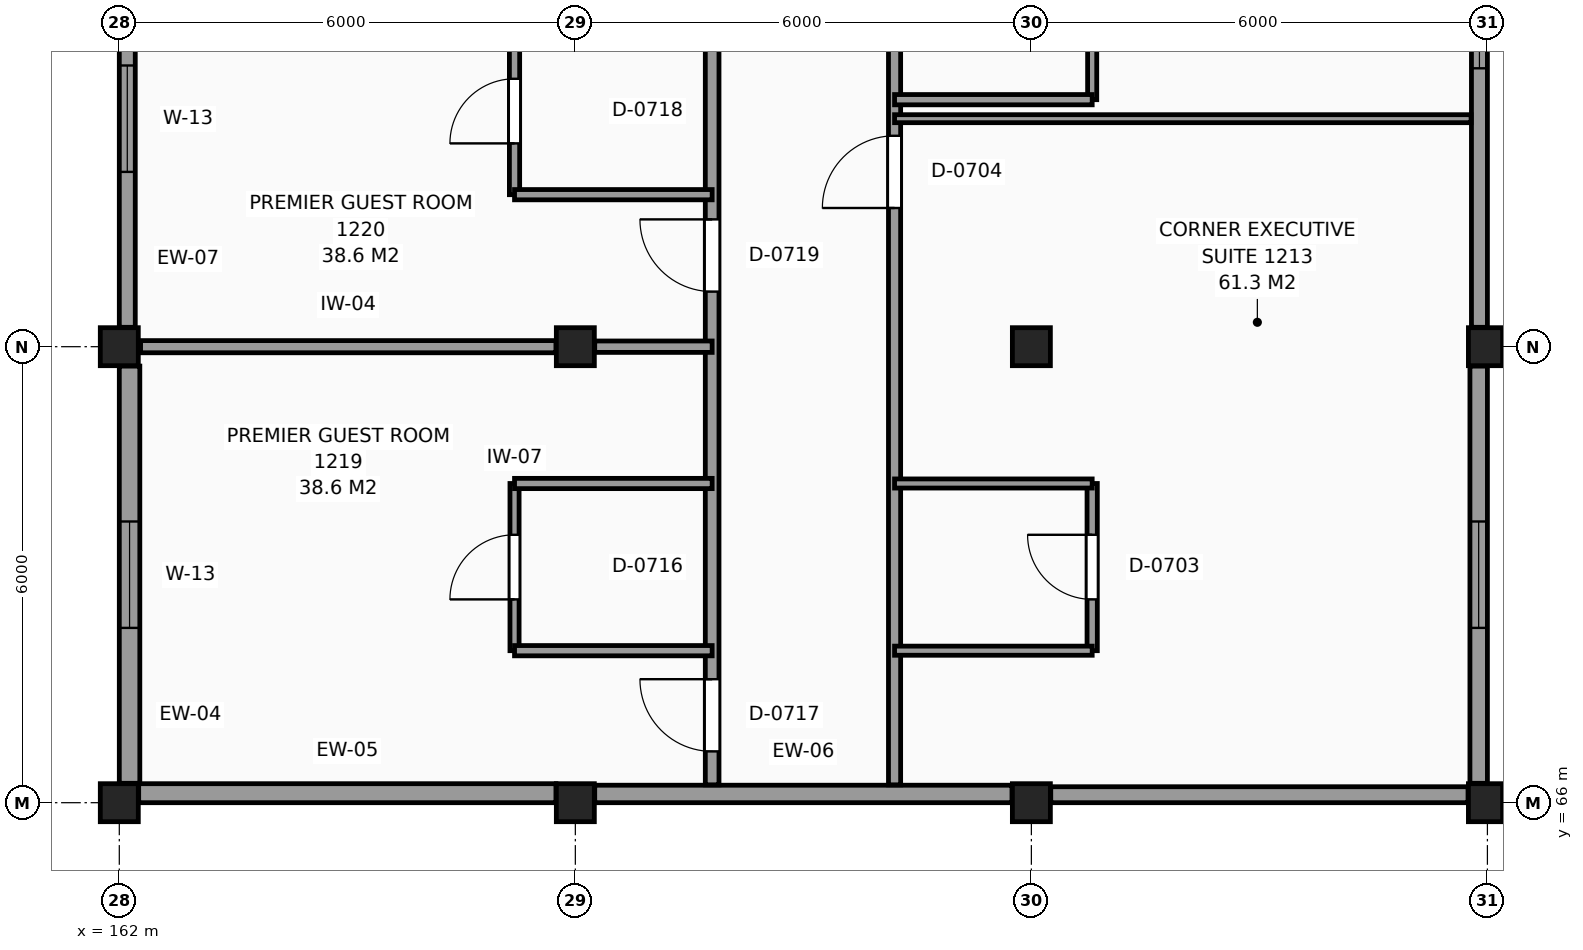
"""IFC4 building model, lengths in metres.
Left out: names, types, materials, properties, quantities, classifications, styles, units other than length and angle.
Written with IfcOpenShell. Run it as: python <this file> out.ifc"""

import sys

from ifc_helpers import new_model, si_unit, direction, frame, frame_2d, origin, origin_2d, place, context, subcontext, project, spatial, rectangle, extrude, element, fill, save


model = new_model("IFC4")
c1 = context("Model", 3, precision=1e-05, world=origin(), true_north=direction((0.0, 1.0)))
c2 = subcontext(c1, "Body", "Model", "MODEL_VIEW")
j1 = project(units=[si_unit("LENGTHUNIT", "METRE"), si_unit("PLANEANGLEUNIT", "RADIAN")], contexts=[c1])
p1 = place(None, origin())
s1 = spatial("IfcSite", under=j1, at=p1, CompositionType="ELEMENT")
p2 = place(p1, origin())
s2 = spatial("IfcBuilding", under=s1, at=p2, CompositionType="ELEMENT")
p3 = place(p2, frame((0.0, 0.0, 48.0)))
s3 = spatial("IfcBuildingStorey", under=s2, at=p3, CompositionType="ELEMENT", Elevation=48.0)
for number, where, z_axis, x_axis in (
    (1, (162.0, 66.0, 0.0), (0.0, 0.0, 1.0), (1.0, 0.0, 0.0)),
    (2, (162.0, 72.0, 0.0), (0.0, 0.0, 1.0), (1.0, 0.0, 0.0)),
    (3, (168.0, 66.0, 0.0), (0.0, 0.0, 1.0), (1.0, 0.0, 0.0)),
    (4, (168.0, 72.0, 0.0), (0.0, 0.0, 1.0), (1.0, 0.0, 0.0)),
    (5, (174.0, 66.0, 0.0), (0.0, 0.0, 1.0), (1.0, 0.0, 0.0)),
    (6, (174.0, 72.0, 0.0), (0.0, 0.0, 1.0), (1.0, 0.0, 0.0)),
    (7, (180.0, 66.0, 0.0), (0.0, 0.0, 1.0), (1.0, 0.0, 0.0)),
    (8, (180.0, 72.0, 0.0), (0.0, 0.0, 1.0), (1.0, 0.0, 0.0)),
):
    element("IfcColumn", number, at=place(p3, frame(where, z_axis=z_axis, x_axis=x_axis)), inside=s3, PredefinedType="COLUMN", context=c2, shape_type="SweptSolid", body=[
        extrude(rectangle(XDim=0.5, YDim=0.5, at=origin_2d()), origin(), (0.0, 0.0, 1.0), 3.3),
    ])
p4 = place(p3, frame((179.885, 66.255, 0.0), z_axis=(0.0, 0.0, 1.0), x_axis=(0.0, 1.0, 0.0)))
e9 = element("IfcWall", 9, at=p4, inside=s3, PredefinedType="SOLIDWALL", context=c2, shape_type="SweptSolid", body=[
    extrude(rectangle(XDim=5.49, YDim=0.23, at=frame_2d((2.745, 0.0))), origin(), (0.0, 0.0, 1.0), 2.4),
])
p5 = place(p4, frame((2.045, 0.0, 0.8)))
e10 = element("IfcOpeningElement", 10, at=p5, cuts=e9, PredefinedType="OPENING", context=c2, shape_type="SweptSolid", body=[
    extrude(rectangle(XDim=1.4, YDim=1.4, at=frame_2d((0.7, 0.7))), frame((0.0, 0.125, 0.0), z_axis=(0.0, -1.0, 0.0), x_axis=(1.0, 0.0, 0.0)), (0.0, 0.0, 1.0), 0.25),
])
p6 = place(p3, frame((179.895, 72.255, 0.0), z_axis=(0.0, 0.0, 1.0), x_axis=(0.0, 1.0, 0.0)))
e11 = element("IfcWall", 11, at=p6, inside=s3, PredefinedType="SOLIDWALL", context=c2, shape_type="SweptSolid", body=[
    extrude(rectangle(XDim=5.49, YDim=0.21, at=frame_2d((2.745, 0.0))), origin(), (0.0, 0.0, 1.0), 2.4),
])
p7 = place(p6, frame((3.408, 0.0, 0.8)))
e12 = element("IfcOpeningElement", 12, at=p7, cuts=e11, PredefinedType="OPENING", context=c2, shape_type="SweptSolid", body=[
    extrude(rectangle(XDim=1.4, YDim=1.4, at=frame_2d((0.7, 0.7))), frame((0.0, 0.115, 0.0), z_axis=(0.0, -1.0, 0.0), x_axis=(1.0, 0.0, 0.0)), (0.0, 0.0, 1.0), 0.23),
])
p8 = place(p3, frame((162.105, 77.745, 0.0), z_axis=(0.0, 0.0, 1.0), x_axis=(0.0, -1.0, 0.0)))
e13 = element("IfcWall", 13, at=p8, inside=s3, PredefinedType="SOLIDWALL", context=c2, shape_type="SweptSolid", body=[
    extrude(rectangle(XDim=5.49, YDim=0.21, at=frame_2d((2.745, 0.0))), origin(), (0.0, 0.0, 1.0), 2.4),
])
p9 = place(p8, frame((2.045, 0.0, 0.8)))
e14 = element("IfcOpeningElement", 14, at=p9, cuts=e13, PredefinedType="OPENING", context=c2, shape_type="SweptSolid", body=[
    extrude(rectangle(XDim=1.4, YDim=1.4, at=frame_2d((0.7, 0.7))), frame((0.0, 0.115, 0.0), z_axis=(0.0, -1.0, 0.0), x_axis=(1.0, 0.0, 0.0)), (0.0, 0.0, 1.0), 0.23),
])
p10 = place(p3, frame((162.135, 71.745, 0.0), z_axis=(0.0, 0.0, 1.0), x_axis=(0.0, -1.0, 0.0)))
e15 = element("IfcWall", 15, at=p10, inside=s3, PredefinedType="SOLIDWALL", context=c2, shape_type="SweptSolid", body=[
    extrude(rectangle(XDim=5.49, YDim=0.27, at=frame_2d((2.745, 0.0))), origin(), (0.0, 0.0, 1.0), 2.4),
])
p11 = place(p10, frame((2.045, 0.0, 0.8)))
e16 = element("IfcOpeningElement", 16, at=p11, cuts=e15, PredefinedType="OPENING", context=c2, shape_type="SweptSolid", body=[
    extrude(rectangle(XDim=1.4, YDim=1.4, at=frame_2d((0.7, 0.7))), frame((0.0, 0.145, 0.0), z_axis=(0.0, -1.0, 0.0), x_axis=(1.0, 0.0, 0.0)), (0.0, 0.0, 1.0), 0.29),
])
p12 = place(p3, frame((162.255, 66.125, 0.0), z_axis=(0.0, 0.0, 1.0), x_axis=(1.0, 0.0, 0.0)))
e17 = element("IfcWall", 17, at=p12, inside=s3, PredefinedType="SOLIDWALL", context=c2, shape_type="SweptSolid", body=[
    extrude(rectangle(XDim=5.49, YDim=0.25, at=frame_2d((2.745, 0.0))), origin(), (0.0, 0.0, 1.0), 2.25),
])
p13 = place(p3, frame((168.255, 66.115, 0.0), z_axis=(0.0, 0.0, 1.0), x_axis=(1.0, 0.0, 0.0)))
e18 = element("IfcWall", 18, at=p13, inside=s3, PredefinedType="SOLIDWALL", context=c2, shape_type="SweptSolid", body=[
    extrude(rectangle(XDim=5.49, YDim=0.23, at=frame_2d((2.745, 0.0))), origin(), (0.0, 0.0, 1.0), 2.25),
])
p14 = place(p3, frame((174.255, 66.105, 0.0), z_axis=(0.0, 0.0, 1.0), x_axis=(1.0, 0.0, 0.0)))
e19 = element("IfcWall", 19, at=p14, inside=s3, PredefinedType="SOLIDWALL", context=c2, shape_type="SweptSolid", body=[
    extrude(rectangle(XDim=5.49, YDim=0.21, at=frame_2d((2.745, 0.0))), origin(), (0.0, 0.0, 1.0), 2.25),
])
p15 = place(p3, frame((167.2, 68.0, 0.0), z_axis=(0.0, 0.0, 1.0), x_axis=(0.0, 1.0, 0.0)))
e20 = element("IfcWall", 20, at=p15, inside=s3, PredefinedType="PARTITIONING", context=c2, shape_type="SweptSolid", body=[
    extrude(rectangle(XDim=2.2, YDim=0.12, at=frame_2d((1.1, 0.0))), origin(), (0.0, 0.0, 1.0), 3.05),
])
p16 = place(p15, frame((0.675, 0.0, 0.0)))
e21 = element("IfcOpeningElement", 21, at=p16, cuts=e20, PredefinedType="OPENING", context=c2, shape_type="SweptSolid", body=[
    extrude(rectangle(XDim=0.85, YDim=2.1, at=frame_2d((0.425, 1.05))), frame((0.0, 0.07, 0.0), z_axis=(0.0, -1.0, 0.0), x_axis=(1.0, 0.0, 0.0)), (0.0, 0.0, 1.0), 0.14),
])
p17 = place(p3, frame((167.2, 74.0, 0.0), z_axis=(0.0, 0.0, 1.0), x_axis=(0.0, 1.0, 0.0)))
e22 = element("IfcWall", 22, at=p17, inside=s3, PredefinedType="PARTITIONING", context=c2, shape_type="SweptSolid", body=[
    extrude(rectangle(XDim=2.2, YDim=0.135, at=frame_2d((1.1, 0.0))), origin(), (0.0, 0.0, 1.0), 3.05),
])
p18 = place(p17, frame((0.675, 0.0, 0.0)))
e23 = element("IfcOpeningElement", 23, at=p18, cuts=e22, PredefinedType="OPENING", context=c2, shape_type="SweptSolid", body=[
    extrude(rectangle(XDim=0.85, YDim=2.1, at=frame_2d((0.425, 1.05))), frame((0.0, 0.078, 0.0), z_axis=(0.0, -1.0, 0.0), x_axis=(1.0, 0.0, 0.0)), (0.0, 0.0, 1.0), 0.155),
])
p19 = place(p3, frame((169.8, 66.235, 0.0), z_axis=(0.0, 0.0, 1.0), x_axis=(0.0, 1.0, 0.0)))
e24 = element("IfcWall", 24, at=p19, inside=s3, PredefinedType="PARTITIONING", context=c2, shape_type="SweptSolid", body=[
    extrude(rectangle(XDim=41.585, YDim=0.18, at=frame_2d((20.792, 0.0))), origin(), (0.0, 0.0, 1.0), 3.05),
])
p20 = place(p19, frame((26.165, 0.0, 0.0)))
e25 = element("IfcOpeningElement", 25, at=p20, cuts=e24, PredefinedType="OPENING", context=c2, shape_type="SweptSolid", body=[
    extrude(rectangle(XDim=1.2, YDim=2.2, at=frame_2d((0.6, 1.1))), frame((0.0, 0.1, 0.0), z_axis=(0.0, -1.0, 0.0), x_axis=(1.0, 0.0, 0.0)), (0.0, 0.0, 1.0), 0.2),
])
p21 = place(p19, frame((0.44, 0.0, 0.0)))
e26 = element("IfcOpeningElement", 26, at=p21, cuts=e24, PredefinedType="OPENING", context=c2, shape_type="SweptSolid", body=[
    extrude(rectangle(XDim=0.95, YDim=2.1, at=frame_2d((0.475, 1.05))), frame((0.0, 0.1, 0.0), z_axis=(0.0, -1.0, 0.0), x_axis=(1.0, 0.0, 0.0)), (0.0, 0.0, 1.0), 0.2),
])
p22 = place(p19, frame((6.49, 0.0, 0.0)))
e27 = element("IfcOpeningElement", 27, at=p22, cuts=e24, PredefinedType="OPENING", context=c2, shape_type="SweptSolid", body=[
    extrude(rectangle(XDim=0.95, YDim=2.1, at=frame_2d((0.475, 1.05))), frame((0.0, 0.1, 0.0), z_axis=(0.0, -1.0, 0.0), x_axis=(1.0, 0.0, 0.0)), (0.0, 0.0, 1.0), 0.2),
])
p23 = place(p19, frame((30.49, 0.0, 0.0)))
e28 = element("IfcOpeningElement", 28, at=p23, cuts=e24, PredefinedType="OPENING", context=c2, shape_type="SweptSolid", body=[
    extrude(rectangle(XDim=0.95, YDim=2.1, at=frame_2d((0.475, 1.05))), frame((0.0, 0.1, 0.0), z_axis=(0.0, -1.0, 0.0), x_axis=(1.0, 0.0, 0.0)), (0.0, 0.0, 1.0), 0.2),
])
p24 = place(p19, frame((36.49, 0.0, 0.0)))
e29 = element("IfcOpeningElement", 29, at=p24, cuts=e24, PredefinedType="OPENING", context=c2, shape_type="SweptSolid", body=[
    extrude(rectangle(XDim=0.95, YDim=2.1, at=frame_2d((0.475, 1.05))), frame((0.0, 0.1, 0.0), z_axis=(0.0, -1.0, 0.0), x_axis=(1.0, 0.0, 0.0)), (0.0, 0.0, 1.0), 0.2),
])
p25 = place(p3, frame((172.2, 66.235, 0.0), z_axis=(0.0, 0.0, 1.0), x_axis=(0.0, 1.0, 0.0)))
e30 = element("IfcWall", 30, at=p25, inside=s3, PredefinedType="PARTITIONING", context=c2, shape_type="SweptSolid", body=[
    extrude(rectangle(XDim=41.585, YDim=0.16, at=frame_2d((20.792, 0.0))), origin(), (0.0, 0.0, 1.0), 3.05),
])
p26 = place(p25, frame((7.59, 0.0, 0.0)))
e31 = element("IfcOpeningElement", 31, at=p26, cuts=e30, PredefinedType="OPENING", context=c2, shape_type="SweptSolid", body=[
    extrude(rectangle(XDim=0.95, YDim=2.1, at=frame_2d((0.475, 1.05))), frame((0.0, 0.09, 0.0), z_axis=(0.0, -1.0, 0.0), x_axis=(1.0, 0.0, 0.0)), (0.0, 0.0, 1.0), 0.18),
])
p27 = place(p25, frame((12.09, 0.0, 0.0)))
e32 = element("IfcOpeningElement", 32, at=p27, cuts=e30, PredefinedType="OPENING", context=c2, shape_type="SweptSolid", body=[
    extrude(rectangle(XDim=0.95, YDim=2.1, at=frame_2d((0.475, 1.05))), frame((0.0, 0.09, 0.0), z_axis=(0.0, -1.0, 0.0), x_axis=(1.0, 0.0, 0.0)), (0.0, 0.0, 1.0), 0.18),
])
p28 = place(p25, frame((16.29, 0.0, 0.0)))
e33 = element("IfcOpeningElement", 33, at=p28, cuts=e30, PredefinedType="OPENING", context=c2, shape_type="SweptSolid", body=[
    extrude(rectangle(XDim=0.95, YDim=2.1, at=frame_2d((0.475, 1.05))), frame((0.0, 0.09, 0.0), z_axis=(0.0, -1.0, 0.0), x_axis=(1.0, 0.0, 0.0)), (0.0, 0.0, 1.0), 0.18),
])
p29 = place(p25, frame((18.49, 0.0, 0.0)))
e34 = element("IfcOpeningElement", 34, at=p29, cuts=e30, PredefinedType="OPENING", context=c2, shape_type="SweptSolid", body=[
    extrude(rectangle(XDim=0.95, YDim=2.1, at=frame_2d((0.475, 1.05))), frame((0.0, 0.09, 0.0), z_axis=(0.0, -1.0, 0.0), x_axis=(1.0, 0.0, 0.0)), (0.0, 0.0, 1.0), 0.18),
])
p30 = place(p25, frame((24.49, 0.0, 0.0)))
e35 = element("IfcOpeningElement", 35, at=p30, cuts=e30, PredefinedType="OPENING", context=c2, shape_type="SweptSolid", body=[
    extrude(rectangle(XDim=0.95, YDim=2.1, at=frame_2d((0.475, 1.05))), frame((0.0, 0.09, 0.0), z_axis=(0.0, -1.0, 0.0), x_axis=(1.0, 0.0, 0.0)), (0.0, 0.0, 1.0), 0.18),
])
p31 = place(p25, frame((38.34, 0.0, 0.0)))
e36 = element("IfcOpeningElement", 36, at=p31, cuts=e30, PredefinedType="OPENING", context=c2, shape_type="SweptSolid", body=[
    extrude(rectangle(XDim=0.95, YDim=2.1, at=frame_2d((0.475, 1.05))), frame((0.0, 0.09, 0.0), z_axis=(0.0, -1.0, 0.0), x_axis=(1.0, 0.0, 0.0)), (0.0, 0.0, 1.0), 0.18),
])
p32 = place(p3, frame((174.8, 68.0, 0.0), z_axis=(0.0, 0.0, 1.0), x_axis=(0.0, 1.0, 0.0)))
e37 = element("IfcWall", 37, at=p32, inside=s3, PredefinedType="PARTITIONING", context=c2, shape_type="SweptSolid", body=[
    extrude(rectangle(XDim=2.2, YDim=0.135, at=frame_2d((1.1, 0.0))), origin(), (0.0, 0.0, 1.0), 3.05),
])
p33 = place(p32, frame((0.675, 0.0, 0.0)))
e38 = element("IfcOpeningElement", 38, at=p33, cuts=e37, PredefinedType="OPENING", context=c2, shape_type="SweptSolid", body=[
    extrude(rectangle(XDim=0.85, YDim=2.1, at=frame_2d((0.425, 1.05))), frame((0.0, 0.078, 0.0), z_axis=(0.0, -1.0, 0.0), x_axis=(1.0, 0.0, 0.0)), (0.0, 0.0, 1.0), 0.155),
])
p34 = place(p3, frame((174.8, 75.25, 0.0), z_axis=(0.0, 0.0, 1.0), x_axis=(0.0, 1.0, 0.0)))
e39 = element("IfcWall", 39, at=p34, inside=s3, PredefinedType="PARTITIONING", context=c2, shape_type="SweptSolid", body=[
    extrude(rectangle(XDim=2.2, YDim=0.12, at=frame_2d((1.1, 0.0))), origin(), (0.0, 0.0, 1.0), 3.05),
])
p35 = place(p34, frame((0.675, 0.0, 0.0)))
e40 = element("IfcOpeningElement", 40, at=p35, cuts=e39, PredefinedType="OPENING", context=c2, shape_type="SweptSolid", body=[
    extrude(rectangle(XDim=0.85, YDim=2.1, at=frame_2d((0.425, 1.05))), frame((0.0, 0.07, 0.0), z_axis=(0.0, -1.0, 0.0), x_axis=(1.0, 0.0, 0.0)), (0.0, 0.0, 1.0), 0.14),
])
p36 = place(p3, frame((167.2, 68.0, 0.0), z_axis=(0.0, 0.0, 1.0), x_axis=(1.0, 0.0, 0.0)))
e41 = element("IfcWall", 41, at=p36, inside=s3, PredefinedType="PARTITIONING", context=c2, shape_type="SweptSolid", body=[
    extrude(rectangle(XDim=2.6, YDim=0.135, at=frame_2d((1.3, 0.0))), origin(), (0.0, 0.0, 1.0), 3.05),
])
p37 = place(p3, frame((172.2, 68.0, 0.0), z_axis=(0.0, 0.0, 1.0), x_axis=(1.0, 0.0, 0.0)))
e42 = element("IfcWall", 42, at=p37, inside=s3, PredefinedType="PARTITIONING", context=c2, shape_type="SweptSolid", body=[
    extrude(rectangle(XDim=2.6, YDim=0.12, at=frame_2d((1.3, 0.0))), origin(), (0.0, 0.0, 1.0), 3.05),
])
p38 = place(p3, frame((167.2, 70.2, 0.0), z_axis=(0.0, 0.0, 1.0), x_axis=(1.0, 0.0, 0.0)))
e43 = element("IfcWall", 43, at=p38, inside=s3, PredefinedType="PARTITIONING", context=c2, shape_type="SweptSolid", body=[
    extrude(rectangle(XDim=2.6, YDim=0.135, at=frame_2d((1.3, 0.0))), origin(), (0.0, 0.0, 1.0), 3.05),
])
p39 = place(p3, frame((172.2, 70.2, 0.0), z_axis=(0.0, 0.0, 1.0), x_axis=(1.0, 0.0, 0.0)))
e44 = element("IfcWall", 44, at=p39, inside=s3, PredefinedType="PARTITIONING", context=c2, shape_type="SweptSolid", body=[
    extrude(rectangle(XDim=2.6, YDim=0.12, at=frame_2d((1.3, 0.0))), origin(), (0.0, 0.0, 1.0), 3.05),
])
p40 = place(p3, frame((162.28, 72.0, 0.0), z_axis=(0.0, 0.0, 1.0), x_axis=(1.0, 0.0, 0.0)))
e45 = element("IfcWall", 45, at=p40, inside=s3, PredefinedType="PARTITIONING", context=c2, shape_type="SweptSolid", body=[
    extrude(rectangle(XDim=5.465, YDim=0.16, at=frame_2d((2.732, 0.0))), origin(), (0.0, 0.0, 1.0), 2.25),
])
p41 = place(p3, frame((168.255, 72.0, 0.0), z_axis=(0.0, 0.0, 1.0), x_axis=(1.0, 0.0, 0.0)))
e46 = element("IfcWall", 46, at=p41, inside=s3, PredefinedType="PARTITIONING", context=c2, shape_type="SweptSolid", body=[
    extrude(rectangle(XDim=1.545, YDim=0.15, at=frame_2d((0.772, 0.0))), origin(), (0.0, 0.0, 1.0), 2.25),
])
p42 = place(p3, frame((167.2, 74.0, 0.0), z_axis=(0.0, 0.0, 1.0), x_axis=(1.0, 0.0, 0.0)))
e47 = element("IfcWall", 47, at=p42, inside=s3, PredefinedType="PARTITIONING", context=c2, shape_type="SweptSolid", body=[
    extrude(rectangle(XDim=2.6, YDim=0.135, at=frame_2d((1.3, 0.0))), origin(), (0.0, 0.0, 1.0), 3.05),
])
p43 = place(p3, frame((172.2, 75.0, 0.0), z_axis=(0.0, 0.0, 1.0), x_axis=(1.0, 0.0, 0.0)))
e48 = element("IfcWall", 48, at=p43, inside=s3, PredefinedType="PARTITIONING", context=c2, shape_type="SweptSolid", body=[
    extrude(rectangle(XDim=7.585, YDim=0.105, at=frame_2d((3.792, 0.0))), origin(), (0.0, 0.0, 1.0), 3.05),
])
p44 = place(p3, frame((172.2, 75.25, 0.0), z_axis=(0.0, 0.0, 1.0), x_axis=(1.0, 0.0, 0.0)))
e49 = element("IfcWall", 49, at=p44, inside=s3, PredefinedType="PARTITIONING", context=c2, shape_type="SweptSolid", body=[
    extrude(rectangle(XDim=2.6, YDim=0.135, at=frame_2d((1.3, 0.0))), origin(), (0.0, 0.0, 1.0), 3.05),
])
p45 = place(p5, origin())
e50 = element("IfcWindow", 50, at=p45, inside=s3, PartitioningType="SINGLE_PANEL", PredefinedType="WINDOW", context=c2, shape_type="SweptSolid", body=[
    extrude(rectangle(XDim=1.4, YDim=1.4, at=frame_2d((0.7, 0.7))), frame((0.0, 0.03, 0.0), z_axis=(0.0, -1.0, 0.0), x_axis=(1.0, 0.0, 0.0)), (0.0, 0.0, 1.0), 0.06),
])
fill(e10, e50)
p46 = place(p7, origin())
e51 = element("IfcWindow", 51, at=p46, inside=s3, PartitioningType="SINGLE_PANEL", PredefinedType="WINDOW", context=c2, shape_type="SweptSolid", body=[
    extrude(rectangle(XDim=1.4, YDim=1.4, at=frame_2d((0.7, 0.7))), frame((0.0, 0.03, 0.0), z_axis=(0.0, -1.0, 0.0), x_axis=(1.0, 0.0, 0.0)), (0.0, 0.0, 1.0), 0.06),
])
fill(e12, e51)
p47 = place(p11, origin())
e52 = element("IfcWindow", 52, at=p47, inside=s3, PartitioningType="SINGLE_PANEL", PredefinedType="WINDOW", context=c2, shape_type="SweptSolid", body=[
    extrude(rectangle(XDim=1.4, YDim=1.4, at=frame_2d((0.7, 0.7))), frame((0.0, 0.03, 0.0), z_axis=(0.0, -1.0, 0.0), x_axis=(1.0, 0.0, 0.0)), (0.0, 0.0, 1.0), 0.06),
])
fill(e16, e52)
p48 = place(p9, origin())
e53 = element("IfcWindow", 53, at=p48, inside=s3, PartitioningType="SINGLE_PANEL", PredefinedType="WINDOW", context=c2, shape_type="SweptSolid", body=[
    extrude(rectangle(XDim=1.4, YDim=1.4, at=frame_2d((0.7, 0.7))), frame((0.0, 0.03, 0.0), z_axis=(0.0, -1.0, 0.0), x_axis=(1.0, 0.0, 0.0)), (0.0, 0.0, 1.0), 0.06),
])
fill(e14, e53)
p49 = place(p33, origin())
e54 = element("IfcDoor", 54, at=p49, inside=s3, OperationType="SINGLE_SWING_RIGHT", PredefinedType="DOOR", context=c2, shape_type="SweptSolid", body=[
    extrude(rectangle(XDim=0.85, YDim=2.1, at=frame_2d((0.425, 1.05))), frame((0.0, 0.025, 0.0), z_axis=(0.0, -1.0, 0.0), x_axis=(1.0, 0.0, 0.0)), (0.0, 0.0, 1.0), 0.05),
])
fill(e38, e54)
p50 = place(p26, origin())
e55 = element("IfcDoor", 55, at=p50, inside=s3, OperationType="SINGLE_SWING_LEFT", PredefinedType="DOOR", context=c2, shape_type="SweptSolid", body=[
    extrude(rectangle(XDim=0.95, YDim=2.1, at=frame_2d((0.475, 1.05))), frame((0.0, 0.025, 0.0), z_axis=(0.0, -1.0, 0.0), x_axis=(1.0, 0.0, 0.0)), (0.0, 0.0, 1.0), 0.05),
])
fill(e31, e55)
p51 = place(p16, origin())
e56 = element("IfcDoor", 56, at=p51, inside=s3, OperationType="SINGLE_SWING_LEFT", PredefinedType="DOOR", context=c2, shape_type="SweptSolid", body=[
    extrude(rectangle(XDim=0.85, YDim=2.1, at=frame_2d((0.425, 1.05))), frame((0.0, 0.025, 0.0), z_axis=(0.0, -1.0, 0.0), x_axis=(1.0, 0.0, 0.0)), (0.0, 0.0, 1.0), 0.05),
])
fill(e21, e56)
p52 = place(p21, origin())
e57 = element("IfcDoor", 57, at=p52, inside=s3, OperationType="SINGLE_SWING_RIGHT", PredefinedType="DOOR", context=c2, shape_type="SweptSolid", body=[
    extrude(rectangle(XDim=0.95, YDim=2.1, at=frame_2d((0.475, 1.05))), frame((0.0, 0.025, 0.0), z_axis=(0.0, -1.0, 0.0), x_axis=(1.0, 0.0, 0.0)), (0.0, 0.0, 1.0), 0.05),
])
fill(e26, e57)
p53 = place(p18, origin())
e58 = element("IfcDoor", 58, at=p53, inside=s3, OperationType="SINGLE_SWING_LEFT", PredefinedType="DOOR", context=c2, shape_type="SweptSolid", body=[
    extrude(rectangle(XDim=0.85, YDim=2.1, at=frame_2d((0.425, 1.05))), frame((0.0, 0.025, 0.0), z_axis=(0.0, -1.0, 0.0), x_axis=(1.0, 0.0, 0.0)), (0.0, 0.0, 1.0), 0.05),
])
fill(e23, e58)
p54 = place(p22, origin())
e59 = element("IfcDoor", 59, at=p54, inside=s3, OperationType="SINGLE_SWING_RIGHT", PredefinedType="DOOR", context=c2, shape_type="SweptSolid", body=[
    extrude(rectangle(XDim=0.95, YDim=2.1, at=frame_2d((0.475, 1.05))), frame((0.0, 0.025, 0.0), z_axis=(0.0, -1.0, 0.0), x_axis=(1.0, 0.0, 0.0)), (0.0, 0.0, 1.0), 0.05),
])
fill(e27, e59)
save(model, sys.argv[1])
